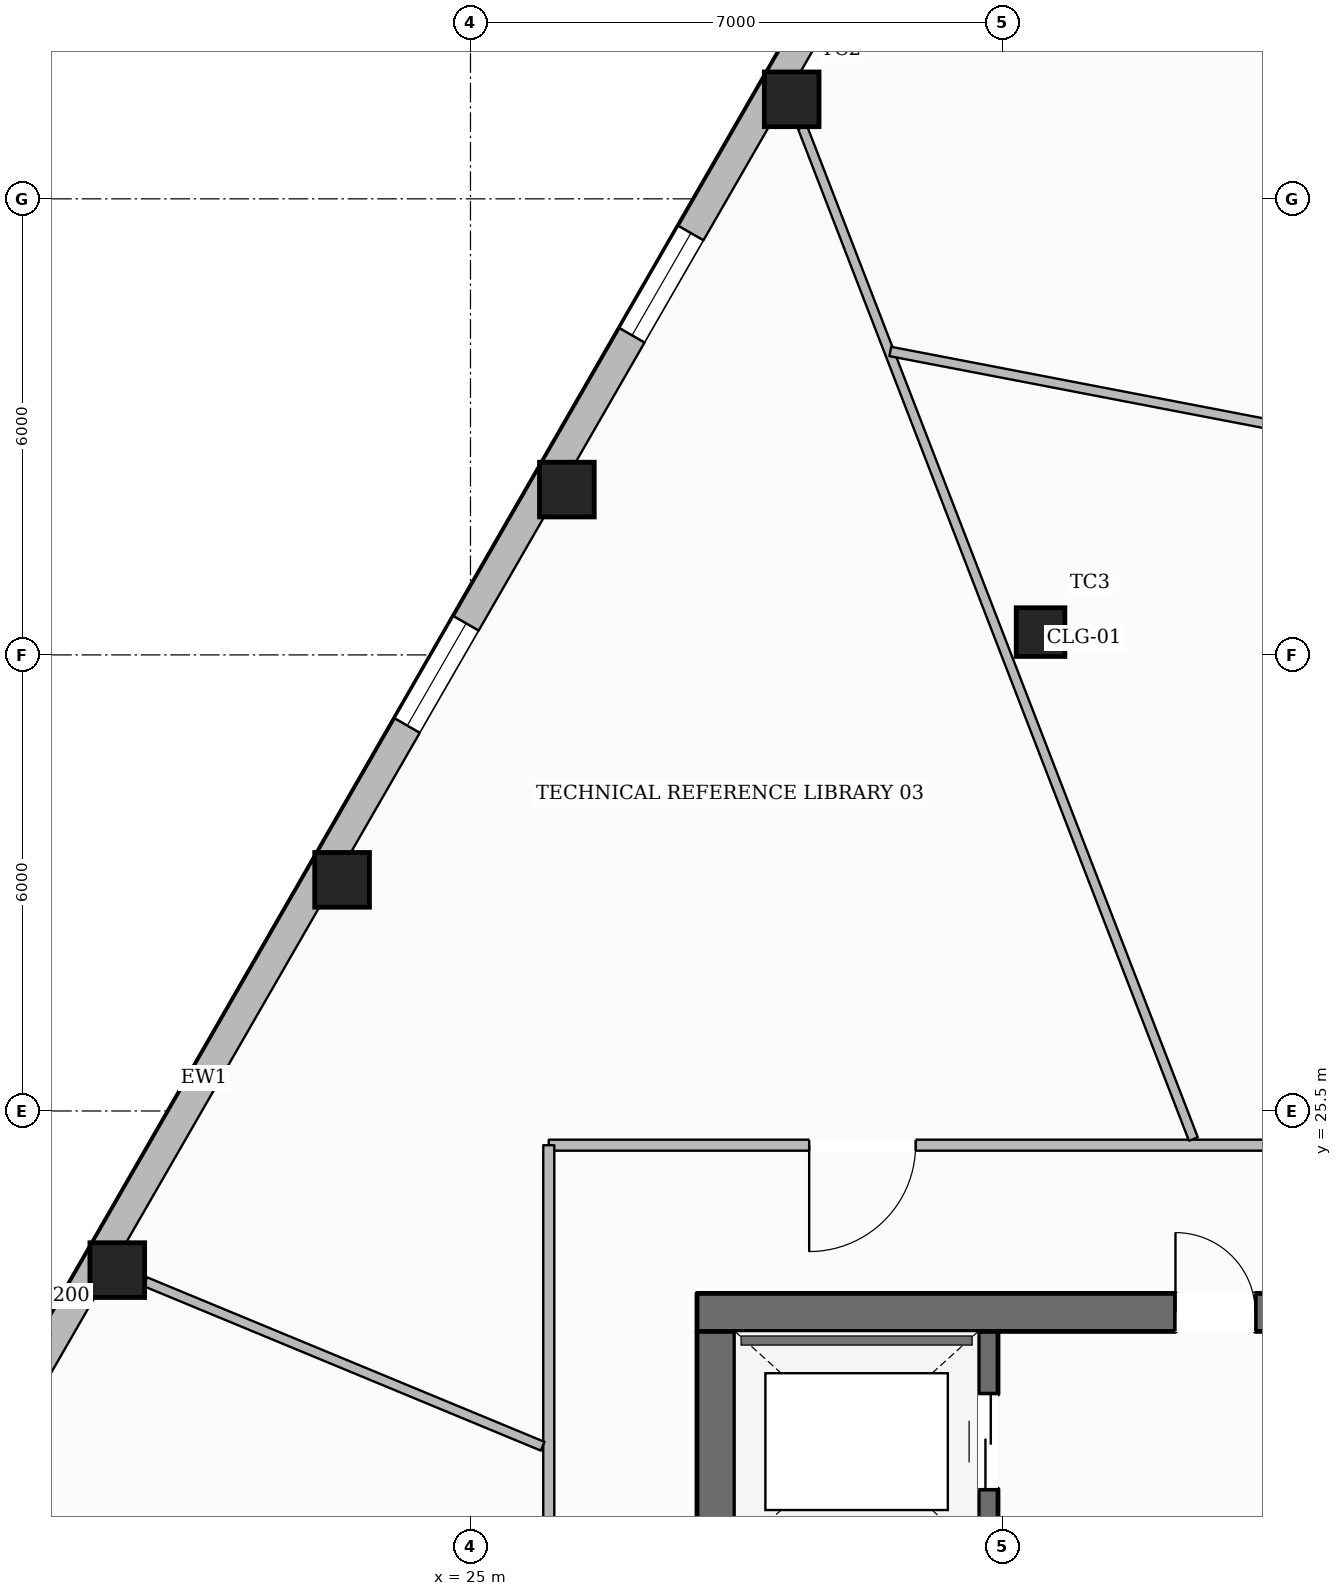
"""IFC4 building model, lengths in metres.
Left out: names, types, materials, properties, quantities, classifications, styles, units other than length and angle.
Written with IfcOpenShell. Run it as: python <this file> out.ifc"""

import sys

from ifc_helpers import new_model, si_unit, direction, frame, frame_2d, origin, origin_2d, place, context, subcontext, project, spatial, rectangle, hollow_rectangle, extrude, element, fill, save


model = new_model("IFC4")
c1 = context("Model", 3, precision=1e-05, world=origin(), true_north=direction((0.0, 1.0)))
c2 = subcontext(c1, "Body", "Model", "MODEL_VIEW")
j1 = project(units=[si_unit("LENGTHUNIT", "METRE"), si_unit("PLANEANGLEUNIT", "RADIAN")], contexts=[c1])
p1 = place(None, origin())
s1 = spatial("IfcSite", under=j1, at=p1, CompositionType="ELEMENT")
p2 = place(p1, origin())
s2 = spatial("IfcBuilding", under=s1, at=p2, CompositionType="ELEMENT")
p3 = place(p2, frame((0.0, 0.0, 120.15)))
s3 = spatial("IfcBuildingStorey", under=s2, at=p3, CompositionType="ELEMENT", Elevation=120.15)
p4 = place(p3, frame((27.98, 22.85, 0.0), z_axis=(0.0, 0.0, 1.0), x_axis=(1.0, 0.0, 0.0)))
e1 = element("IfcWall", 1, at=p4, inside=s3, PredefinedType="SOLIDWALL", context=c2, shape_type="SweptSolid", body=[
    extrude(rectangle(XDim=20.04, YDim=0.5, at=frame_2d((10.02, 0.0))), origin(), (0.0, 0.0, 1.0), 3.6),
])
p5 = place(p4, frame((6.295, 0.0, 0.0)))
e2 = element("IfcOpeningElement", 2, at=p5, cuts=e1, PredefinedType="OPENING", context=c2, shape_type="SweptSolid", body=[
    extrude(rectangle(XDim=1.05, YDim=2.15, at=frame_2d((0.525, 1.075))), frame((0.0, 0.26, 0.0), z_axis=(0.0, -1.0, 0.0), x_axis=(1.0, 0.0, 0.0)), (0.0, 0.0, 1.0), 0.52),
])
p6 = place(p4, frame((12.695, 0.0, 0.0)))
e3 = element("IfcOpeningElement", 3, at=p6, cuts=e1, PredefinedType="OPENING", context=c2, shape_type="SweptSolid", body=[
    extrude(rectangle(XDim=1.05, YDim=2.15, at=frame_2d((0.525, 1.075))), frame((0.0, 0.26, 0.0), z_axis=(0.0, -1.0, 0.0), x_axis=(1.0, 0.0, 0.0)), (0.0, 0.0, 1.0), 0.52),
])
p7 = place(p3, frame((28.23, 9.6, 0.0), z_axis=(0.0, 0.0, 1.0), x_axis=(0.0, 1.0, 0.0)))
e4 = element("IfcWall", 4, at=p7, inside=s3, PredefinedType="SOLIDWALL", context=c2, shape_type="SweptSolid", body=[
    extrude(rectangle(XDim=13.0, YDim=0.5, at=frame_2d((6.5, 0.0))), origin(), (0.0, 0.0, 1.0), 3.6),
])
p8 = place(p7, frame((0.2, 0.0, 0.0)))
e5 = element("IfcOpeningElement", 5, at=p8, cuts=e4, PredefinedType="OPENING", context=c2, shape_type="SweptSolid", body=[
    extrude(rectangle(XDim=1.1, YDim=2.15, at=frame_2d((0.55, 1.075))), frame((0.0, 0.26, 0.0), z_axis=(0.0, -1.0, 0.0), x_axis=(1.0, 0.0, 0.0)), (0.0, 0.0, 1.0), 0.52),
])
p9 = place(p7, frame((8.4, 0.0, 0.0)))
e6 = element("IfcOpeningElement", 6, at=p9, cuts=e4, PredefinedType="OPENING", context=c2, shape_type="SweptSolid", body=[
    extrude(rectangle(XDim=0.9, YDim=2.1, at=frame_2d((0.45, 1.05))), frame((0.0, 0.26, 0.0), z_axis=(0.0, -1.0, 0.0), x_axis=(1.0, 0.0, 0.0)), (0.0, 0.0, 1.0), 0.52),
])
p10 = place(p3, frame((31.81, 9.6, 0.0), z_axis=(0.0, 0.0, 1.0), x_axis=(0.0, 1.0, 0.0)))
e7 = element("IfcWall", 7, at=p10, inside=s3, PredefinedType="SHEAR", context=c2, shape_type="SweptSolid", body=[
    extrude(rectangle(XDim=13.0, YDim=0.26, at=frame_2d((6.5, 0.0))), origin(), (0.0, 0.0, 1.0), 3.6),
])
p11 = place(p10, frame((10.925, 0.0, 0.0)))
e8 = element("IfcOpeningElement", 8, at=p11, cuts=e7, PredefinedType="OPENING", context=c2, shape_type="SweptSolid", body=[
    extrude(rectangle(XDim=1.25, YDim=2.25, at=frame_2d((0.625, 1.125))), frame((0.0, 0.14, 0.0), z_axis=(0.0, -1.0, 0.0), x_axis=(1.0, 0.0, 0.0)), (0.0, 0.0, 1.0), 0.28),
])
for number, where, z_axis, x_axis in (
    (9, (29.226, 38.809, 0.0), (0.0, 0.0, 1.0), (1.0, 0.0, 0.0)),
    (10, (26.268, 33.675, 0.0), (0.0, 0.0, 1.0), (1.0, 0.0, 0.0)),
    (11, (23.311, 28.541, 0.0), (0.0, 0.0, 1.0), (1.0, 0.0, 0.0)),
    (12, (20.354, 23.406, 0.0), (0.0, 0.0, 1.0), (1.0, 0.0, 0.0)),
):
    element("IfcColumn", number, at=place(p3, frame(where, z_axis=z_axis, x_axis=x_axis)), inside=s3, PredefinedType="COLUMN", context=c2, shape_type="SweptSolid", body=[
        extrude(hollow_rectangle(XDim=0.72, YDim=0.72, WallThickness=0.032, at=origin_2d()), origin(), (0.0, 0.0, 1.0), 3.6),
    ])
p12 = place(p3, frame((32.5, 31.8, 0.0), z_axis=(0.0, 0.0, 1.0), x_axis=(1.0, 0.0, 0.0)))
e13 = element("IfcColumn", 13, at=p12, inside=s3, PredefinedType="COLUMN", context=c2, shape_type="SweptSolid", body=[
    extrude(hollow_rectangle(XDim=0.64, YDim=0.64, WallThickness=0.028, at=origin_2d()), origin(), (0.0, 0.0, 1.0), 3.6),
])
p13 = place(p3, frame((13.966, 12.858, 0.0), z_axis=(0.0, 0.0, 1.0), x_axis=(0.499138995893, 0.86652193439, 0.0)))
e14 = element("IfcWall", 14, at=p13, inside=s3, PredefinedType="STANDARD", context=c2, shape_type="SweptSolid", body=[
    extrude(rectangle(XDim=36.509, YDim=0.38, at=frame_2d((18.255, 0.0))), origin(), (0.0, 0.0, 1.0), 3.059),
])
p14 = place(p13, frame((8.727, 0.0, 0.0)))
e15 = element("IfcOpeningElement", 15, at=p14, cuts=e14, PredefinedType="OPENING", context=c2, shape_type="SweptSolid", body=[
    extrude(rectangle(XDim=1.0, YDim=2.2, at=frame_2d((0.5, 1.1))), frame((0.0, 0.2, 0.0), z_axis=(0.0, -1.0, 0.0), x_axis=(1.0, 0.0, 0.0)), (0.0, 0.0, 1.0), 0.4),
])
p15 = place(p13, frame((32.292, 0.0, 0.65)))
e16 = element("IfcOpeningElement", 16, at=p15, cuts=e14, PredefinedType="OPENING", context=c2, shape_type="SweptSolid", body=[
    extrude(rectangle(XDim=1.55, YDim=1.75, at=frame_2d((0.775, 0.875))), frame((0.0, 0.2, 0.0), z_axis=(0.0, -1.0, 0.0), x_axis=(1.0, 0.0, 0.0)), (0.0, 0.0, 1.0), 0.4),
])
p16 = place(p13, frame((26.367, 0.0, 0.65)))
e17 = element("IfcOpeningElement", 17, at=p16, cuts=e14, PredefinedType="OPENING", context=c2, shape_type="SweptSolid", body=[
    extrude(rectangle(XDim=1.55, YDim=1.75, at=frame_2d((0.775, 0.875))), frame((0.0, 0.2, 0.0), z_axis=(0.0, -1.0, 0.0), x_axis=(1.0, 0.0, 0.0)), (0.0, 0.0, 1.0), 0.4),
])
p17 = place(p13, frame((20.442, 0.0, 0.65)))
e18 = element("IfcOpeningElement", 18, at=p17, cuts=e14, PredefinedType="OPENING", context=c2, shape_type="SweptSolid", body=[
    extrude(rectangle(XDim=1.55, YDim=1.75, at=frame_2d((0.775, 0.875))), frame((0.0, 0.2, 0.0), z_axis=(0.0, -1.0, 0.0), x_axis=(1.0, 0.0, 0.0)), (0.0, 0.0, 1.0), 0.4),
])
p18 = place(p13, frame((2.666, 0.0, 0.65)))
e19 = element("IfcOpeningElement", 19, at=p18, cuts=e14, PredefinedType="OPENING", context=c2, shape_type="SweptSolid", body=[
    extrude(rectangle(XDim=1.55, YDim=1.75, at=frame_2d((0.775, 0.875))), frame((0.0, 0.2, 0.0), z_axis=(0.0, -1.0, 0.0), x_axis=(1.0, 0.0, 0.0)), (0.0, 0.0, 1.0), 0.4),
])
p19 = place(p3, frame((49.97, 25.05, 0.0), z_axis=(0.0, 0.0, 1.0), x_axis=(-1.0, 0.0, 0.0)))
e20 = element("IfcWall", 20, at=p19, inside=s3, PredefinedType="PARTITIONING", context=c2, shape_type="SweptSolid", body=[
    extrude(rectangle(XDim=23.94, YDim=0.145, at=frame_2d((11.97, 0.0))), origin(), (0.0, 0.0, 1.0), 3.6),
])
p20 = place(p19, frame((6.893, 0.0, 0.0)))
e21 = element("IfcOpeningElement", 21, at=p20, cuts=e20, PredefinedType="OPENING", context=c2, shape_type="SweptSolid", body=[
    extrude(rectangle(XDim=1.4, YDim=2.2, at=frame_2d((0.7, 1.1))), frame((0.0, 0.083, 0.0), z_axis=(0.0, -1.0, 0.0), x_axis=(1.0, 0.0, 0.0)), (0.0, 0.0, 1.0), 0.165),
])
p21 = place(p19, frame((19.114, 0.0, 0.0)))
e22 = element("IfcOpeningElement", 22, at=p21, cuts=e20, PredefinedType="OPENING", context=c2, shape_type="SweptSolid", body=[
    extrude(rectangle(XDim=1.4, YDim=2.2, at=frame_2d((0.7, 1.1))), frame((0.0, 0.083, 0.0), z_axis=(0.0, -1.0, 0.0), x_axis=(1.0, 0.0, 0.0)), (0.0, 0.0, 1.0), 0.165),
])
p22 = place(p3, frame((26.03, 25.05, 0.0), z_axis=(0.0, 0.0, 1.0), x_axis=(0.0, -1.0, 0.0)))
e23 = element("IfcWall", 23, at=p22, inside=s3, PredefinedType="PARTITIONING", context=c2, shape_type="SweptSolid", body=[
    extrude(rectangle(XDim=17.9, YDim=0.145, at=frame_2d((8.95, 0.0))), origin(), (0.0, 0.0, 1.0), 3.288),
])
p23 = place(p22, frame((8.438, 0.0, 0.0)))
e24 = element("IfcOpeningElement", 24, at=p23, cuts=e23, PredefinedType="OPENING", context=c2, shape_type="SweptSolid", body=[
    extrude(rectangle(XDim=1.4, YDim=2.2, at=frame_2d((0.7, 1.1))), frame((0.0, 0.083, 0.0), z_axis=(0.0, -1.0, 0.0), x_axis=(1.0, 0.0, 0.0)), (0.0, 0.0, 1.0), 0.165),
])
p24 = place(p3, frame((34.511, 25.131, 0.0), z_axis=(0.0, 0.0, 1.0), x_axis=(-0.360420932728, 0.932789767982, 0.0)))
e25 = element("IfcWall", 25, at=p24, inside=s3, PredefinedType="PARTITIONING", context=c2, shape_type="SweptSolid", body=[
    extrude(rectangle(XDim=14.27, YDim=0.125, at=frame_2d((7.135, 0.0))), origin(), (0.0, 0.0, 1.0), 3.141),
])
p25 = place(p3, frame((25.949, 21.089, 0.0), z_axis=(0.0, 0.0, 1.0), x_axis=(-0.923924819646, 0.382574081246, 0.0)))
e26 = element("IfcWall", 26, at=p25, inside=s3, PredefinedType="PARTITIONING", context=c2, shape_type="SweptSolid", body=[
    extrude(rectangle(XDim=5.658, YDim=0.125, at=frame_2d((2.829, 0.0))), origin(), (0.0, 0.0, 1.0), 3.141),
])
p26 = place(p3, frame((51.345, 31.49, 0.0), z_axis=(0.0, 0.0, 1.0), x_axis=(-0.982025578243, 0.188747883902, 0.0)))
e27 = element("IfcWall", 27, at=p26, inside=s3, PredefinedType="PARTITIONING", context=c2, shape_type="SweptSolid", body=[
    extrude(rectangle(XDim=21.203, YDim=0.125, at=frame_2d((10.601, 0.0))), origin(), (0.0, 0.0, 1.0), 3.288),
])
p27 = place(p26, frame((9.969, 0.0, 0.0)))
e28 = element("IfcOpeningElement", 28, at=p27, cuts=e27, PredefinedType="OPENING", context=c2, shape_type="SweptSolid", body=[
    extrude(rectangle(XDim=1.02, YDim=2.15, at=frame_2d((0.51, 1.075))), frame((0.0, 0.073, 0.0), z_axis=(0.0, -1.0, 0.0), x_axis=(1.0, 0.0, 0.0)), (0.0, 0.0, 1.0), 0.145),
])
p28 = place(p16, origin())
e29 = element("IfcWindow", 29, at=p28, inside=s3, PartitioningType="SINGLE_PANEL", PredefinedType="WINDOW", context=c2, shape_type="SweptSolid", body=[
    extrude(rectangle(XDim=1.55, YDim=1.75, at=frame_2d((0.775, 0.875))), frame((0.0, 0.03, 0.0), z_axis=(0.0, -1.0, 0.0), x_axis=(1.0, 0.0, 0.0)), (0.0, 0.0, 1.0), 0.06),
])
fill(e17, e29)
p29 = place(p17, origin())
e30 = element("IfcWindow", 30, at=p29, inside=s3, PartitioningType="SINGLE_PANEL", PredefinedType="WINDOW", context=c2, shape_type="SweptSolid", body=[
    extrude(rectangle(XDim=1.55, YDim=1.75, at=frame_2d((0.775, 0.875))), frame((0.0, 0.03, 0.0), z_axis=(0.0, -1.0, 0.0), x_axis=(1.0, 0.0, 0.0)), (0.0, 0.0, 1.0), 0.06),
])
fill(e18, e30)
p30 = place(p5, origin())
e31 = element("IfcDoor", 31, at=p30, inside=s3, OperationType="SINGLE_SWING_LEFT", PredefinedType="DOOR", context=c2, shape_type="SweptSolid", body=[
    extrude(rectangle(XDim=1.05, YDim=2.15, at=frame_2d((0.525, 1.075))), frame((0.0, 0.025, 0.0), z_axis=(0.0, -1.0, 0.0), x_axis=(1.0, 0.0, 0.0)), (0.0, 0.0, 1.0), 0.05),
])
fill(e2, e31)
p31 = place(p11, origin())
e32 = element("IfcDoor", 32, at=p31, inside=s3, OperationType="DOUBLE_DOOR_SLIDING", PredefinedType="DOOR", context=c2, shape_type="SweptSolid", body=[
    extrude(rectangle(XDim=1.25, YDim=2.25, at=frame_2d((0.625, 1.125))), frame((0.0, 0.025, 0.0), z_axis=(0.0, -1.0, 0.0), x_axis=(1.0, 0.0, 0.0)), (0.0, 0.0, 1.0), 0.05),
])
fill(e8, e32)
p32 = place(p21, origin())
e33 = element("IfcDoor", 33, at=p32, inside=s3, OperationType="SINGLE_SWING_RIGHT", PredefinedType="DOOR", context=c2, shape_type="SweptSolid", body=[
    extrude(rectangle(XDim=1.4, YDim=2.2, at=frame_2d((0.7, 1.1))), frame((0.0, 0.025, 0.0), z_axis=(0.0, -1.0, 0.0), x_axis=(1.0, 0.0, 0.0)), (0.0, 0.0, 1.0), 0.05),
])
fill(e22, e33)
save(model, sys.argv[1])
